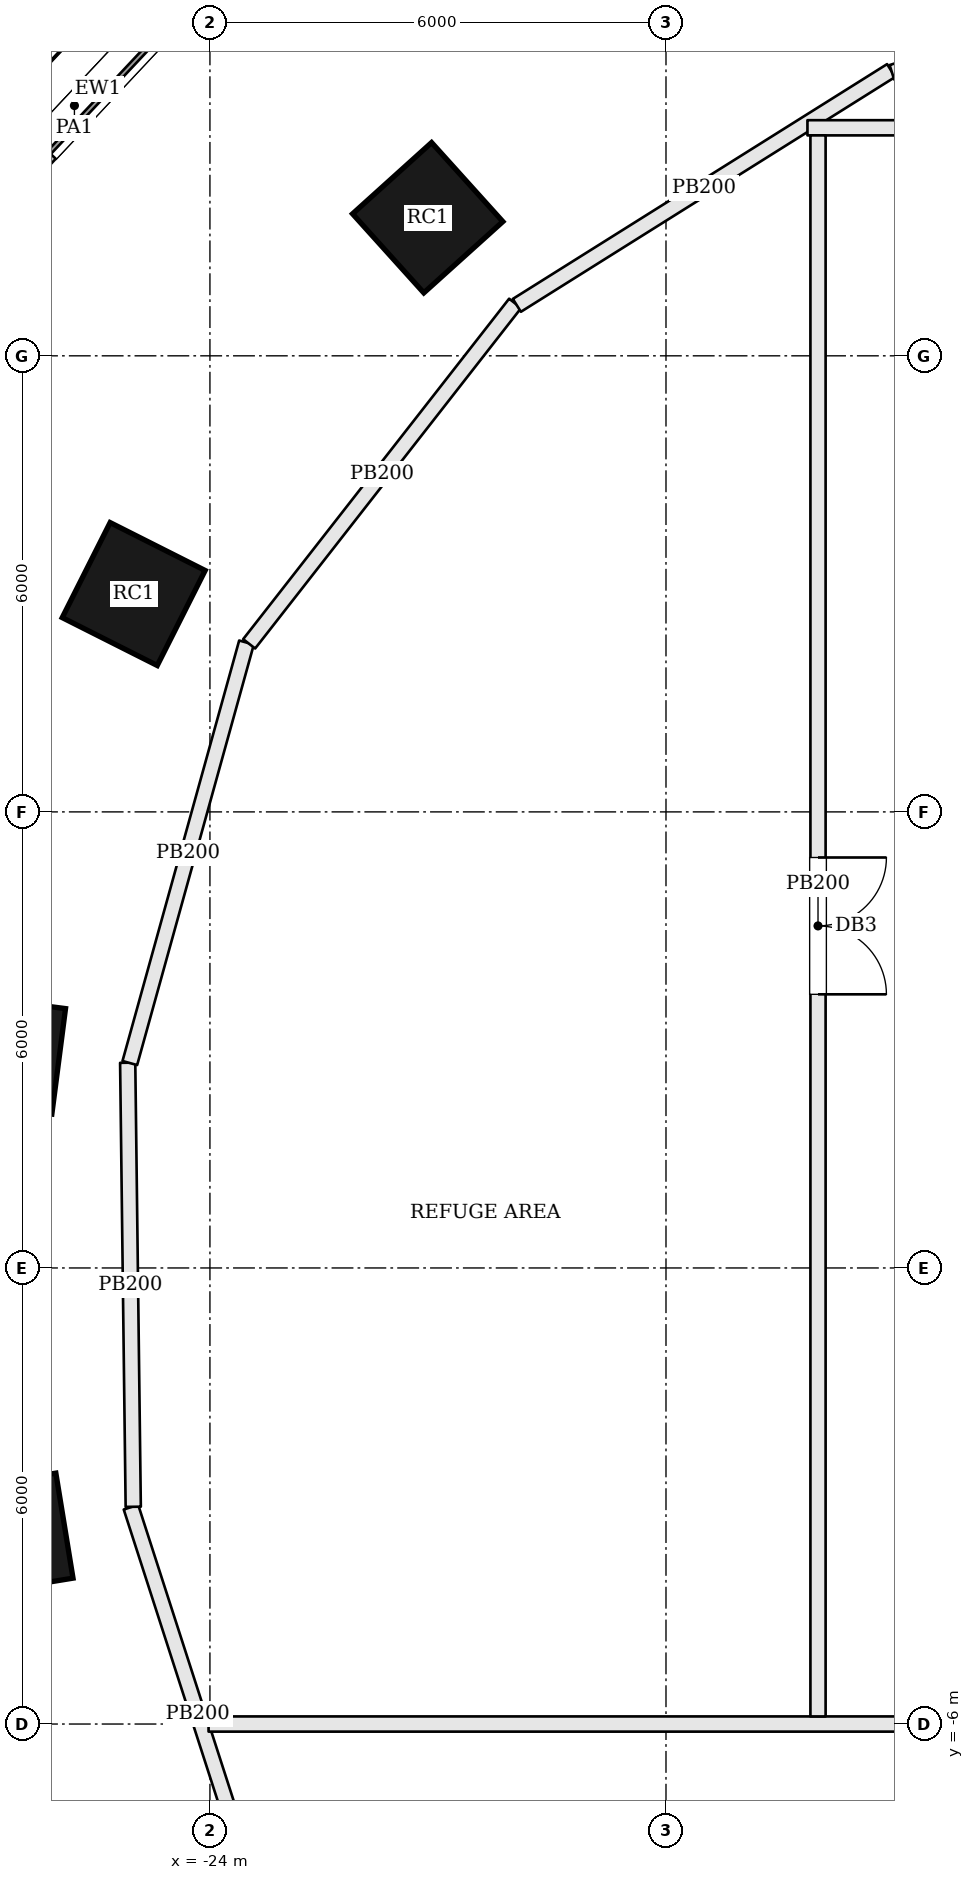
"""IFC4 building model, lengths in metres.
Left out: names, types, materials, properties, quantities, classifications, styles, units other than length and angle.
Written with IfcOpenShell. Run it as: python <this file> out.ifc"""

import sys

from ifc_helpers import new_model, si_unit, direction, frame, frame_2d, origin, origin_2d, place, context, subcontext, project, spatial, rectangle, extrude, element, fill, save


model = new_model("IFC4")
c1 = context("Model", 3, precision=1e-05, world=origin(), true_north=direction((0.0, 1.0)))
c2 = subcontext(c1, "Body", "Model", "MODEL_VIEW")
j1 = project(units=[si_unit("LENGTHUNIT", "METRE"), si_unit("PLANEANGLEUNIT", "RADIAN")], contexts=[c1])
p1 = place(None, origin())
s1 = spatial("IfcSite", under=j1, at=p1, CompositionType="ELEMENT")
p2 = place(p1, origin())
s2 = spatial("IfcBuilding", under=s1, at=p2, CompositionType="ELEMENT")
p3 = place(p2, frame((0.0, 0.0, 55.5)))
s3 = spatial("IfcBuildingStorey", under=s2, at=p3, CompositionType="ELEMENT", Elevation=55.5)
for number, where, z_axis, x_axis in (
    (1, (-21.135, 13.817, 0.0), (0.0, 0.0, 1.0), (-0.743, -0.67, 0.0)),
    (2, (-25.003, 8.866, 0.0), (0.0, 0.0, 1.0), (-0.45, -0.893, 0.0)),
    (3, (-26.684, 2.808, 0.0), (0.0, 0.0, 1.0), (-0.128, -0.992, 0.0)),
    (4, (-26.605, -3.503, 0.0), (0.0, 0.0, 1.0), (0.161, -0.987, 0.0)),
):
    element("IfcColumn", number, at=place(p3, frame(where, z_axis=z_axis, x_axis=x_axis)), inside=s3, PredefinedType="COLUMN", context=c2, shape_type="SweptSolid", body=[
        extrude(rectangle(XDim=1.4, YDim=1.4, at=origin_2d()), origin(), (0.0, 0.0, 1.0), 3.6),
    ])
p4 = place(p3, frame((-23.822, 17.273, 0.0), z_axis=(0.0, 0.0, 1.0), x_axis=(-0.684173167988, -0.729319598122, 0.0)))
e5 = element("IfcWall", 5, at=p4, inside=s3, PredefinedType="SOLIDWALL", context=c2, shape_type="SweptSolid", body=[
    extrude(rectangle(XDim=4.829, YDim=0.45, at=frame_2d((2.415, 0.0))), origin(), (0.0, 0.0, 1.0), 3.4),
])
p5 = place(p4, frame((1.365, 0.0, 0.9)))
e6 = element("IfcOpeningElement", 6, at=p5, cuts=e5, PredefinedType="OPENING", context=c2, shape_type="SweptSolid", body=[
    extrude(rectangle(XDim=2.1, YDim=2.0, at=frame_2d((1.05, 1.0))), frame((0.0, 0.235, 0.0), z_axis=(0.0, -1.0, 0.0), x_axis=(1.0, 0.0, 0.0)), (0.0, 0.0, 1.0), 0.47),
])
p6 = place(p3, frame((-24.481, 16.68, 3.6), z_axis=(0.0, 0.0, 1.0), x_axis=(-0.684154586848, -0.729337028606, 0.0)))
e7 = element("IfcWall", 7, at=p6, inside=s3, PredefinedType="PARAPET", context=c2, shape_type="SweptSolid", body=[
    extrude(rectangle(XDim=3.804, YDim=0.3, at=frame_2d((1.902, 0.0))), origin(), (0.0, 0.0, 1.0), 1.1),
])
p7 = place(p3, frame((-23.282, -8.593, 0.0), z_axis=(0.0, 0.0, 1.0), x_axis=(-0.307048901132, 0.951693738717, 0.0)))
e8 = element("IfcWall", 8, at=p7, inside=s3, PredefinedType="PARTITIONING", context=c2, shape_type="SweptSolid", body=[
    extrude(rectangle(XDim=5.722, YDim=0.2, at=frame_2d((2.861, 0.0))), origin(), (0.0, 0.0, 1.0), 3.4),
])
p8 = place(p3, frame((-24.018, -6.0, 0.0), z_axis=(0.0, 0.0, 1.0), x_axis=(1.0, 0.0, 0.0)))
e9 = element("IfcWall", 9, at=p8, inside=s3, PredefinedType="PARTITIONING", context=c2, shape_type="SweptSolid", body=[
    extrude(rectangle(XDim=48.056, YDim=0.2, at=frame_2d((24.028, 0.0))), origin(), (0.0, 0.0, 1.0), 3.4),
])
p9 = place(p8, frame((23.118, 0.0, 0.0)))
e10 = element("IfcOpeningElement", 10, at=p9, cuts=e9, PredefinedType="OPENING", context=c2, shape_type="SweptSolid", body=[
    extrude(rectangle(XDim=1.8, YDim=2.1, at=frame_2d((0.9, 1.05))), frame((0.0, 0.11, 0.0), z_axis=(0.0, -1.0, 0.0), x_axis=(1.0, 0.0, 0.0)), (0.0, 0.0, 1.0), 0.22),
])
p10 = place(p3, frame((-25.009, -3.142, 0.0), z_axis=(0.0, 0.0, 1.0), x_axis=(-0.012494323245, 0.999921942897, 0.0)))
e11 = element("IfcWall", 11, at=p10, inside=s3, PredefinedType="PARTITIONING", context=c2, shape_type="SweptSolid", body=[
    extrude(rectangle(XDim=5.843, YDim=0.2, at=frame_2d((2.921, 0.0))), origin(), (0.0, 0.0, 1.0), 3.4),
])
p11 = place(p3, frame((-25.054, 2.696, 0.0), z_axis=(0.0, 0.0, 1.0), x_axis=(0.267360914268, 0.96359646197, 0.0)))
e12 = element("IfcWall", 12, at=p11, inside=s3, PredefinedType="PARTITIONING", context=c2, shape_type="SweptSolid", body=[
    extrude(rectangle(XDim=5.741, YDim=0.2, at=frame_2d((2.871, 0.0))), origin(), (0.0, 0.0, 1.0), 3.4),
])
p12 = place(p3, frame((-23.484, 8.211, 0.0), z_axis=(0.0, 0.0, 1.0), x_axis=(0.61559569305, 0.788062143932, 0.0)))
e13 = element("IfcWall", 13, at=p12, inside=s3, PredefinedType="PARTITIONING", context=c2, shape_type="SweptSolid", body=[
    extrude(rectangle(XDim=5.684, YDim=0.2, at=frame_2d((2.842, 0.0))), origin(), (0.0, 0.0, 1.0), 3.4),
])
p13 = place(p3, frame((-19.962, 12.664, 0.0), z_axis=(0.0, 0.0, 1.0), x_axis=(0.847109868331, 0.531417793243, 0.0)))
e14 = element("IfcWall", 14, at=p13, inside=s3, PredefinedType="PARTITIONING", context=c2, shape_type="SweptSolid", body=[
    extrude(rectangle(XDim=5.812, YDim=0.2, at=frame_2d((2.906, 0.0))), origin(), (0.0, 0.0, 1.0), 3.4),
])
p14 = place(p3, frame((-16.139, 15.0, 0.0), z_axis=(0.0, 0.0, 1.0), x_axis=(1.0, 0.0, 0.0)))
e15 = element("IfcWall", 15, at=p14, inside=s3, PredefinedType="PARTITIONING", context=c2, shape_type="SweptSolid", body=[
    extrude(rectangle(XDim=32.205, YDim=0.2, at=frame_2d((16.103, 0.0))), origin(), (0.0, 0.0, 1.0), 3.4),
])
p15 = place(p14, frame((15.239, 0.0, 0.0)))
e16 = element("IfcOpeningElement", 16, at=p15, cuts=e15, PredefinedType="OPENING", context=c2, shape_type="SweptSolid", body=[
    extrude(rectangle(XDim=1.8, YDim=2.1, at=frame_2d((0.9, 1.05))), frame((0.0, 0.11, 0.0), z_axis=(0.0, -1.0, 0.0), x_axis=(1.0, 0.0, 0.0)), (0.0, 0.0, 1.0), 0.22),
])
p16 = place(p3, frame((-16.0, 14.9, 0.0), z_axis=(0.0, 0.0, 1.0), x_axis=(0.0, -1.0, 0.0)))
e17 = element("IfcWall", 17, at=p16, inside=s3, PredefinedType="PARTITIONING", context=c2, shape_type="SweptSolid", body=[
    extrude(rectangle(XDim=20.8, YDim=0.2, at=frame_2d((10.4, 0.0))), origin(), (0.0, 0.0, 1.0), 3.4),
])
p17 = place(p16, frame((9.5, 0.0, 0.0)))
e18 = element("IfcOpeningElement", 18, at=p17, cuts=e17, PredefinedType="OPENING", context=c2, shape_type="SweptSolid", body=[
    extrude(rectangle(XDim=1.8, YDim=2.1, at=frame_2d((0.9, 1.05))), frame((0.0, 0.11, 0.0), z_axis=(0.0, -1.0, 0.0), x_axis=(1.0, 0.0, 0.0)), (0.0, 0.0, 1.0), 0.22),
])
p18 = place(p3, frame((-15.028, 15.73, 0.0), z_axis=(0.0, 0.0, 1.0), x_axis=(0.953899230101, 0.300127071108, 0.0)))
e19 = element("IfcWall", 19, at=p18, inside=s3, PredefinedType="PARTITIONING", context=c2, shape_type="SweptSolid", body=[
    extrude(rectangle(XDim=5.958, YDim=0.2, at=frame_2d((2.979, 0.0))), origin(), (0.0, 0.0, 1.0), 3.4),
])
p19 = place(p5, origin())
e20 = element("IfcWindow", 20, at=p19, inside=s3, PartitioningType="SINGLE_PANEL", PredefinedType="WINDOW", context=c2, shape_type="SweptSolid", body=[
    extrude(rectangle(XDim=2.1, YDim=2.0, at=frame_2d((1.05, 1.0))), frame((0.0, 0.135, 0.0), z_axis=(0.0, -1.0, 0.0), x_axis=(1.0, 0.0, 0.0)), (0.0, 0.0, 1.0), 0.06),
])
fill(e6, e20)
p20 = place(p17, origin())
e21 = element("IfcDoor", 21, at=p20, inside=s3, OperationType="DOUBLE_DOOR_SINGLE_SWING", PredefinedType="DOOR", context=c2, shape_type="SweptSolid", body=[
    extrude(rectangle(XDim=1.8, YDim=2.1, at=frame_2d((0.9, 1.05))), frame((0.0, 0.025, 0.0), z_axis=(0.0, -1.0, 0.0), x_axis=(1.0, 0.0, 0.0)), (0.0, 0.0, 1.0), 0.05),
])
fill(e18, e21)
save(model, sys.argv[1])
